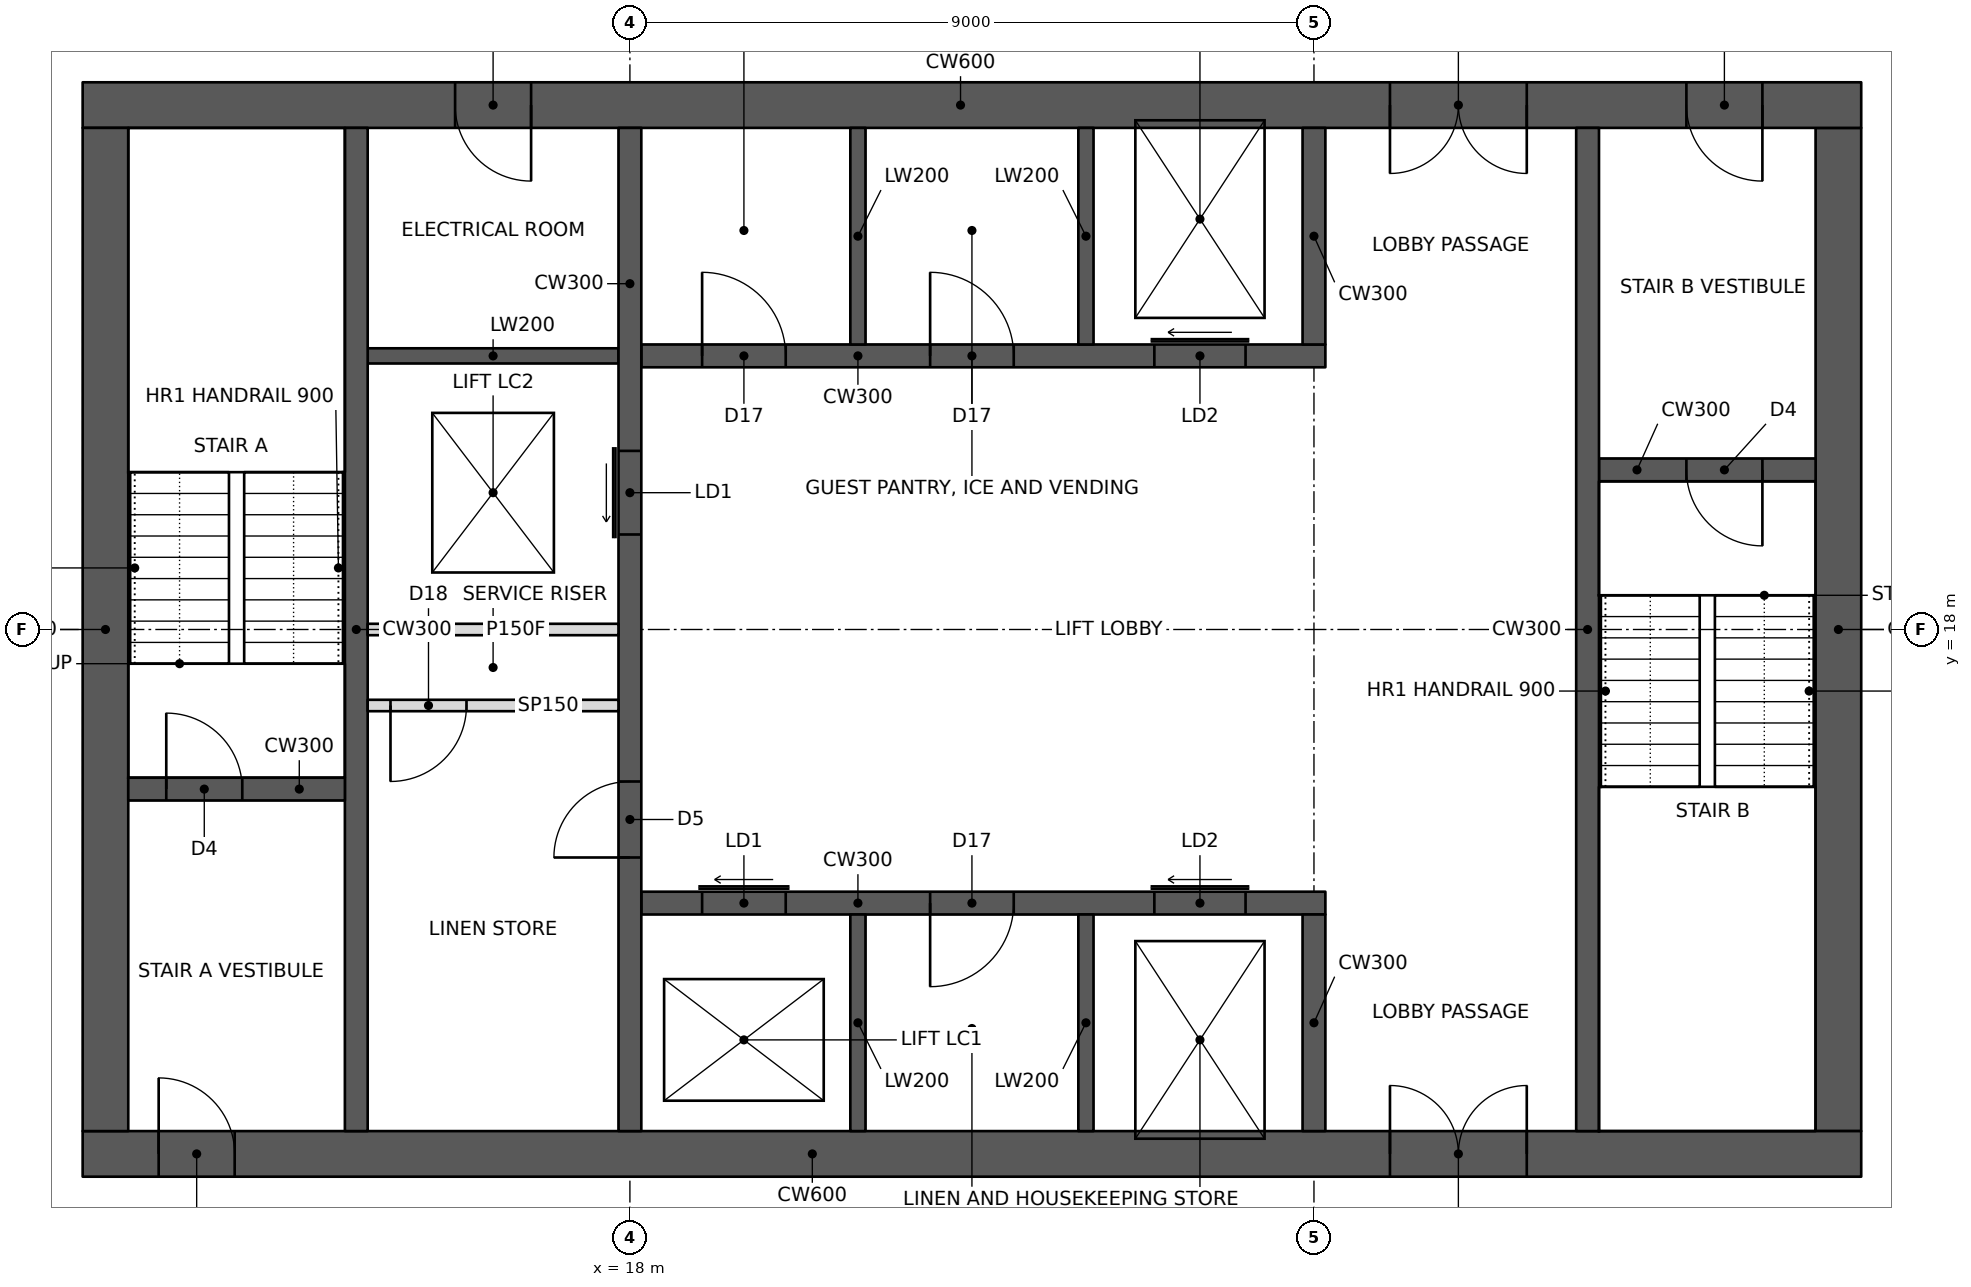
"""IFC4 building model, lengths in metres.
Left out: names, types, materials, properties, quantities, classifications, styles, units other than length and angle.
Written with IfcOpenShell. Run it as: python <this file> out.ifc"""

import sys

from ifc_helpers import new_model, si_unit, direction, frame, frame_2d, origin, place, context, subcontext, project, spatial, rectangle, extrude, element, fill, save


model = new_model("IFC4")
c1 = context("Model", 3, precision=1e-05, world=origin(), true_north=direction((0.0, 1.0)))
c2 = subcontext(c1, "Body", "Model", "MODEL_VIEW")
j1 = project(units=[si_unit("LENGTHUNIT", "METRE"), si_unit("PLANEANGLEUNIT", "RADIAN")], contexts=[c1])
p1 = place(None, origin())
s1 = spatial("IfcSite", under=j1, at=p1, CompositionType="ELEMENT")
p2 = place(p1, origin())
s2 = spatial("IfcBuilding", under=s1, at=p2, CompositionType="ELEMENT")
p3 = place(p2, frame((0.0, 0.0, 180.8)))
s3 = spatial("IfcBuildingStorey", under=s2, at=p3, CompositionType="ELEMENT", Elevation=180.8)
p4 = place(p3, frame((10.8, 11.1, 0.0), z_axis=(0.0, 0.0, 1.0), x_axis=(1.0, 0.0, 0.0)))
e1 = element("IfcWall", 1, at=p4, inside=s3, PredefinedType="SHEAR", context=c2, shape_type="SweptSolid", body=[
    extrude(rectangle(XDim=23.4, YDim=0.6, at=frame_2d((11.7, 0.0))), origin(), (0.0, 0.0, 1.0), 3.4),
])
p5 = place(p4, frame((1.0, 0.0, 0.0)))
e2 = element("IfcOpeningElement", 2, at=p5, cuts=e1, PredefinedType="OPENING", context=c2, shape_type="SweptSolid", body=[
    extrude(rectangle(XDim=1.0, YDim=2.1, at=frame_2d((0.5, 1.05))), frame((0.0, 0.31, 0.0), z_axis=(0.0, -1.0, 0.0), x_axis=(1.0, 0.0, 0.0)), (0.0, 0.0, 1.0), 0.62),
])
p6 = place(p4, frame((17.2, 0.0, 0.0)))
e3 = element("IfcOpeningElement", 3, at=p6, cuts=e1, PredefinedType="OPENING", context=c2, shape_type="SweptSolid", body=[
    extrude(rectangle(XDim=1.8, YDim=2.1, at=frame_2d((0.9, 1.05))), frame((0.0, 0.31, 0.0), z_axis=(0.0, -1.0, 0.0), x_axis=(1.0, 0.0, 0.0)), (0.0, 0.0, 1.0), 0.62),
])
p7 = place(p3, frame((10.8, 24.9, 0.0), z_axis=(0.0, 0.0, 1.0), x_axis=(1.0, 0.0, 0.0)))
e4 = element("IfcWall", 4, at=p7, inside=s3, PredefinedType="SHEAR", context=c2, shape_type="SweptSolid", body=[
    extrude(rectangle(XDim=23.4, YDim=0.6, at=frame_2d((11.7, 0.0))), origin(), (0.0, 0.0, 1.0), 3.4),
])
p8 = place(p7, frame((17.2, 0.0, 0.0)))
e5 = element("IfcOpeningElement", 5, at=p8, cuts=e4, PredefinedType="OPENING", context=c2, shape_type="SweptSolid", body=[
    extrude(rectangle(XDim=1.8, YDim=2.1, at=frame_2d((0.9, 1.05))), frame((0.0, 0.31, 0.0), z_axis=(0.0, -1.0, 0.0), x_axis=(1.0, 0.0, 0.0)), (0.0, 0.0, 1.0), 0.62),
])
p9 = place(p7, frame((21.1, 0.0, 0.0)))
e6 = element("IfcOpeningElement", 6, at=p9, cuts=e4, PredefinedType="OPENING", context=c2, shape_type="SweptSolid", body=[
    extrude(rectangle(XDim=1.0, YDim=2.1, at=frame_2d((0.5, 1.05))), frame((0.0, 0.31, 0.0), z_axis=(0.0, -1.0, 0.0), x_axis=(1.0, 0.0, 0.0)), (0.0, 0.0, 1.0), 0.62),
])
p10 = place(p7, frame((4.9, 0.0, 0.0)))
e7 = element("IfcOpeningElement", 7, at=p10, cuts=e4, PredefinedType="OPENING", context=c2, shape_type="SweptSolid", body=[
    extrude(rectangle(XDim=1.0, YDim=2.1, at=frame_2d((0.5, 1.05))), frame((0.0, 0.31, 0.0), z_axis=(0.0, -1.0, 0.0), x_axis=(1.0, 0.0, 0.0)), (0.0, 0.0, 1.0), 0.62),
])
for number, where, z_axis, x_axis in (
    (8, (11.1, 11.4, 0.0), (0.0, 0.0, 1.0), (0.0, 1.0, 0.0)),
    (9, (33.9, 11.4, 0.0), (0.0, 0.0, 1.0), (0.0, 1.0, 0.0)),
):
    element("IfcWall", number, at=place(p3, frame(where, z_axis=z_axis, x_axis=x_axis)), inside=s3, PredefinedType="SHEAR", context=c2, shape_type="SweptSolid", body=[
        extrude(rectangle(XDim=13.2, YDim=0.6, at=frame_2d((6.6, 0.0))), origin(), (0.0, 0.0, 1.0), 3.4),
    ])
p11 = place(p3, frame((14.4, 11.4, 0.0), z_axis=(0.0, 0.0, 1.0), x_axis=(0.0, 1.0, 0.0)))
e10 = element("IfcWall", 10, at=p11, inside=s3, PredefinedType="SHEAR", context=c2, shape_type="SweptSolid", body=[
    extrude(rectangle(XDim=13.2, YDim=0.3, at=frame_2d((6.6, 0.0))), origin(), (0.0, 0.0, 1.0), 3.4),
])
p12 = place(p3, frame((11.4, 15.9, 0.0), z_axis=(0.0, 0.0, 1.0), x_axis=(1.0, 0.0, 0.0)))
e11 = element("IfcWall", 11, at=p12, inside=s3, PredefinedType="SHEAR", context=c2, shape_type="SweptSolid", body=[
    extrude(rectangle(XDim=2.85, YDim=0.3, at=frame_2d((1.425, 0.0))), origin(), (0.0, 0.0, 1.0), 3.4),
])
p13 = place(p12, frame((0.5, 0.0, 0.0)))
e12 = element("IfcOpeningElement", 12, at=p13, cuts=e11, PredefinedType="OPENING", context=c2, shape_type="SweptSolid", body=[
    extrude(rectangle(XDim=1.0, YDim=2.1, at=frame_2d((0.5, 1.05))), frame((0.0, 0.16, 0.0), z_axis=(0.0, -1.0, 0.0), x_axis=(1.0, 0.0, 0.0)), (0.0, 0.0, 1.0), 0.32),
])
p14 = place(p3, frame((18.0, 11.4, 0.0), z_axis=(0.0, 0.0, 1.0), x_axis=(0.0, 1.0, 0.0)))
e13 = element("IfcWall", 13, at=p14, inside=s3, PredefinedType="SHEAR", context=c2, shape_type="SweptSolid", body=[
    extrude(rectangle(XDim=13.2, YDim=0.3, at=frame_2d((6.6, 0.0))), origin(), (0.0, 0.0, 1.0), 3.4),
])
p15 = place(p14, frame((3.6, 0.0, 0.0)))
e14 = element("IfcOpeningElement", 14, at=p15, cuts=e13, PredefinedType="OPENING", context=c2, shape_type="SweptSolid", body=[
    extrude(rectangle(XDim=1.0, YDim=2.1, at=frame_2d((0.5, 1.05))), frame((0.0, 0.16, 0.0), z_axis=(0.0, -1.0, 0.0), x_axis=(1.0, 0.0, 0.0)), (0.0, 0.0, 1.0), 0.32),
])
p16 = place(p14, frame((7.85, 0.0, 0.0)))
e15 = element("IfcOpeningElement", 15, at=p16, cuts=e13, PredefinedType="OPENING", context=c2, shape_type="SweptSolid", body=[
    extrude(rectangle(XDim=1.1, YDim=2.1, at=frame_2d((0.55, 1.05))), frame((0.0, 0.16, 0.0), z_axis=(0.0, -1.0, 0.0), x_axis=(1.0, 0.0, 0.0)), (0.0, 0.0, 1.0), 0.32),
])
p17 = place(p3, frame((14.55, 18.0, 0.0), z_axis=(0.0, 0.0, 1.0), x_axis=(1.0, 0.0, 0.0)))
e16 = element("IfcWall", 16, at=p17, inside=s3, PredefinedType="PARTITIONING", context=c2, shape_type="SweptSolid", body=[
    extrude(rectangle(XDim=3.3, YDim=0.15, at=frame_2d((1.65, 0.0))), origin(), (0.0, 0.0, 1.0), 3.2),
])
p18 = place(p3, frame((18.15, 14.4, 0.0), z_axis=(0.0, 0.0, 1.0), x_axis=(1.0, 0.0, 0.0)))
e17 = element("IfcWall", 17, at=p18, inside=s3, PredefinedType="SHEAR", context=c2, shape_type="SweptSolid", body=[
    extrude(rectangle(XDim=9.0, YDim=0.3, at=frame_2d((4.5, 0.0))), origin(), (0.0, 0.0, 1.0), 3.4),
])
p19 = place(p18, frame((0.8, 0.0, 0.0)))
e18 = element("IfcOpeningElement", 18, at=p19, cuts=e17, PredefinedType="OPENING", context=c2, shape_type="SweptSolid", body=[
    extrude(rectangle(XDim=1.1, YDim=2.1, at=frame_2d((0.55, 1.05))), frame((0.0, 0.16, 0.0), z_axis=(0.0, -1.0, 0.0), x_axis=(1.0, 0.0, 0.0)), (0.0, 0.0, 1.0), 0.32),
])
p20 = place(p18, frame((6.75, 0.0, 0.0)))
e19 = element("IfcOpeningElement", 19, at=p20, cuts=e17, PredefinedType="OPENING", context=c2, shape_type="SweptSolid", body=[
    extrude(rectangle(XDim=1.2, YDim=2.1, at=frame_2d((0.6, 1.05))), frame((0.0, 0.16, 0.0), z_axis=(0.0, -1.0, 0.0), x_axis=(1.0, 0.0, 0.0)), (0.0, 0.0, 1.0), 0.32),
])
p21 = place(p18, frame((3.8, 0.0, 0.0)))
e20 = element("IfcOpeningElement", 20, at=p21, cuts=e17, PredefinedType="OPENING", context=c2, shape_type="SweptSolid", body=[
    extrude(rectangle(XDim=1.1, YDim=2.1, at=frame_2d((0.55, 1.05))), frame((0.0, 0.16, 0.0), z_axis=(0.0, -1.0, 0.0), x_axis=(1.0, 0.0, 0.0)), (0.0, 0.0, 1.0), 0.32),
])
p22 = place(p3, frame((27.0, 11.4, 0.0), z_axis=(0.0, 0.0, 1.0), x_axis=(0.0, 1.0, 0.0)))
e21 = element("IfcWall", 21, at=p22, inside=s3, PredefinedType="SHEAR", context=c2, shape_type="SweptSolid", body=[
    extrude(rectangle(XDim=2.85, YDim=0.3, at=frame_2d((1.425, 0.0))), origin(), (0.0, 0.0, 1.0), 3.4),
])
for number, where, z_axis, x_axis in (
    (22, (21.0, 11.4, 0.0), (0.0, 0.0, 1.0), (0.0, 1.0, 0.0)),
    (23, (24.0, 11.4, 0.0), (0.0, 0.0, 1.0), (0.0, 1.0, 0.0)),
):
    element("IfcWall", number, at=place(p3, frame(where, z_axis=z_axis, x_axis=x_axis)), inside=s3, PredefinedType="SHEAR", context=c2, shape_type="SweptSolid", body=[
        extrude(rectangle(XDim=2.85, YDim=0.2, at=frame_2d((1.425, 0.0))), origin(), (0.0, 0.0, 1.0), 3.4),
    ])
p23 = place(p3, frame((18.15, 21.6, 0.0), z_axis=(0.0, 0.0, 1.0), x_axis=(1.0, 0.0, 0.0)))
e24 = element("IfcWall", 24, at=p23, inside=s3, PredefinedType="SHEAR", context=c2, shape_type="SweptSolid", body=[
    extrude(rectangle(XDim=9.0, YDim=0.3, at=frame_2d((4.5, 0.0))), origin(), (0.0, 0.0, 1.0), 3.4),
])
p24 = place(p23, frame((6.75, 0.0, 0.0)))
e25 = element("IfcOpeningElement", 25, at=p24, cuts=e24, PredefinedType="OPENING", context=c2, shape_type="SweptSolid", body=[
    extrude(rectangle(XDim=1.2, YDim=2.1, at=frame_2d((0.6, 1.05))), frame((0.0, 0.16, 0.0), z_axis=(0.0, -1.0, 0.0), x_axis=(1.0, 0.0, 0.0)), (0.0, 0.0, 1.0), 0.32),
])
p25 = place(p23, frame((0.8, 0.0, 0.0)))
e26 = element("IfcOpeningElement", 26, at=p25, cuts=e24, PredefinedType="OPENING", context=c2, shape_type="SweptSolid", body=[
    extrude(rectangle(XDim=1.1, YDim=2.1, at=frame_2d((0.55, 1.05))), frame((0.0, 0.16, 0.0), z_axis=(0.0, -1.0, 0.0), x_axis=(1.0, 0.0, 0.0)), (0.0, 0.0, 1.0), 0.32),
])
p26 = place(p23, frame((3.8, 0.0, 0.0)))
e27 = element("IfcOpeningElement", 27, at=p26, cuts=e24, PredefinedType="OPENING", context=c2, shape_type="SweptSolid", body=[
    extrude(rectangle(XDim=1.1, YDim=2.1, at=frame_2d((0.55, 1.05))), frame((0.0, 0.16, 0.0), z_axis=(0.0, -1.0, 0.0), x_axis=(1.0, 0.0, 0.0)), (0.0, 0.0, 1.0), 0.32),
])
p27 = place(p3, frame((27.0, 21.75, 0.0), z_axis=(0.0, 0.0, 1.0), x_axis=(0.0, 1.0, 0.0)))
e28 = element("IfcWall", 28, at=p27, inside=s3, PredefinedType="SHEAR", context=c2, shape_type="SweptSolid", body=[
    extrude(rectangle(XDim=2.85, YDim=0.3, at=frame_2d((1.425, 0.0))), origin(), (0.0, 0.0, 1.0), 3.4),
])
for number, where, z_axis, x_axis in (
    (29, (21.0, 21.75, 0.0), (0.0, 0.0, 1.0), (0.0, 1.0, 0.0)),
    (30, (24.0, 21.75, 0.0), (0.0, 0.0, 1.0), (0.0, 1.0, 0.0)),
):
    element("IfcWall", number, at=place(p3, frame(where, z_axis=z_axis, x_axis=x_axis)), inside=s3, PredefinedType="SHEAR", context=c2, shape_type="SweptSolid", body=[
        extrude(rectangle(XDim=2.85, YDim=0.2, at=frame_2d((1.425, 0.0))), origin(), (0.0, 0.0, 1.0), 3.4),
    ])
p28 = place(p3, frame((30.6, 11.4, 0.0), z_axis=(0.0, 0.0, 1.0), x_axis=(0.0, 1.0, 0.0)))
e31 = element("IfcWall", 31, at=p28, inside=s3, PredefinedType="SHEAR", context=c2, shape_type="SweptSolid", body=[
    extrude(rectangle(XDim=13.2, YDim=0.3, at=frame_2d((6.6, 0.0))), origin(), (0.0, 0.0, 1.0), 3.4),
])
p29 = place(p3, frame((30.75, 20.1, 0.0), z_axis=(0.0, 0.0, 1.0), x_axis=(1.0, 0.0, 0.0)))
e32 = element("IfcWall", 32, at=p29, inside=s3, PredefinedType="SHEAR", context=c2, shape_type="SweptSolid", body=[
    extrude(rectangle(XDim=2.85, YDim=0.3, at=frame_2d((1.425, 0.0))), origin(), (0.0, 0.0, 1.0), 3.4),
])
p30 = place(p29, frame((1.15, 0.0, 0.0)))
e33 = element("IfcOpeningElement", 33, at=p30, cuts=e32, PredefinedType="OPENING", context=c2, shape_type="SweptSolid", body=[
    extrude(rectangle(XDim=1.0, YDim=2.1, at=frame_2d((0.5, 1.05))), frame((0.0, 0.16, 0.0), z_axis=(0.0, -1.0, 0.0), x_axis=(1.0, 0.0, 0.0)), (0.0, 0.0, 1.0), 0.32),
])
p31 = place(p3, frame((14.55, 21.6, 0.0), z_axis=(0.0, 0.0, 1.0), x_axis=(1.0, 0.0, 0.0)))
e34 = element("IfcWall", 34, at=p31, inside=s3, PredefinedType="SHEAR", context=c2, shape_type="SweptSolid", body=[
    extrude(rectangle(XDim=3.3, YDim=0.2, at=frame_2d((1.65, 0.0))), origin(), (0.0, 0.0, 1.0), 3.4),
])
p32 = place(p3, frame((14.55, 17.0, 0.0), z_axis=(0.0, 0.0, 1.0), x_axis=(1.0, 0.0, 0.0)))
e35 = element("IfcWall", 35, at=p32, inside=s3, PredefinedType="PARTITIONING", context=c2, shape_type="SweptSolid", body=[
    extrude(rectangle(XDim=3.3, YDim=0.15, at=frame_2d((1.65, 0.0))), origin(), (0.0, 0.0, 1.0), 3.2),
])
p33 = place(p32, frame((0.3, 0.0, 0.0)))
e36 = element("IfcOpeningElement", 36, at=p33, cuts=e35, PredefinedType="OPENING", context=c2, shape_type="SweptSolid", body=[
    extrude(rectangle(XDim=1.0, YDim=2.1, at=frame_2d((0.5, 1.05))), frame((0.0, 0.085, 0.0), z_axis=(0.0, -1.0, 0.0), x_axis=(1.0, 0.0, 0.0)), (0.0, 0.0, 1.0), 0.17),
])
p34 = place(p33, frame((1.0, 0.0, 0.0), z_axis=(0.0, 0.0, 1.0), x_axis=(-1.0, 0.0, 0.0)))
e37 = element("IfcDoor", 37, at=p34, inside=s3, OperationType="SINGLE_SWING_RIGHT", PredefinedType="DOOR", context=c2, shape_type="SweptSolid", body=[
    extrude(rectangle(XDim=1.0, YDim=2.1, at=frame_2d((0.5, 1.05))), frame((0.0, 0.025, 0.0), z_axis=(0.0, -1.0, 0.0), x_axis=(1.0, 0.0, 0.0)), (0.0, 0.0, 1.0), 0.05),
])
fill(e36, e37)
p35 = place(p5, origin())
e38 = element("IfcDoor", 38, at=p35, inside=s3, OperationType="SINGLE_SWING_LEFT", PredefinedType="DOOR", context=c2, shape_type="SweptSolid", body=[
    extrude(rectangle(XDim=1.0, YDim=2.1, at=frame_2d((0.5, 1.05))), frame((0.0, 0.025, 0.0), z_axis=(0.0, -1.0, 0.0), x_axis=(1.0, 0.0, 0.0)), (0.0, 0.0, 1.0), 0.05),
])
fill(e2, e38)
p36 = place(p13, origin())
e39 = element("IfcDoor", 39, at=p36, inside=s3, OperationType="SINGLE_SWING_LEFT", PredefinedType="DOOR", context=c2, shape_type="SweptSolid", body=[
    extrude(rectangle(XDim=1.0, YDim=2.1, at=frame_2d((0.5, 1.05))), frame((0.0, 0.025, 0.0), z_axis=(0.0, -1.0, 0.0), x_axis=(1.0, 0.0, 0.0)), (0.0, 0.0, 1.0), 0.05),
])
fill(e12, e39)
p37 = place(p6, origin())
e40 = element("IfcDoor", 40, at=p37, inside=s3, OperationType="DOUBLE_DOOR_SINGLE_SWING", PredefinedType="DOOR", context=c2, shape_type="SweptSolid", body=[
    extrude(rectangle(XDim=1.8, YDim=2.1, at=frame_2d((0.9, 1.05))), frame((0.0, 0.025, 0.0), z_axis=(0.0, -1.0, 0.0), x_axis=(1.0, 0.0, 0.0)), (0.0, 0.0, 1.0), 0.05),
])
fill(e3, e40)
p38 = place(p8, frame((1.8, 0.0, 0.0), z_axis=(0.0, 0.0, 1.0), x_axis=(-1.0, 0.0, 0.0)))
e41 = element("IfcDoor", 41, at=p38, inside=s3, OperationType="DOUBLE_DOOR_SINGLE_SWING", PredefinedType="DOOR", context=c2, shape_type="SweptSolid", body=[
    extrude(rectangle(XDim=1.8, YDim=2.1, at=frame_2d((0.9, 1.05))), frame((0.0, 0.025, 0.0), z_axis=(0.0, -1.0, 0.0), x_axis=(1.0, 0.0, 0.0)), (0.0, 0.0, 1.0), 0.05),
])
fill(e5, e41)
p39 = place(p9, frame((1.0, 0.0, 0.0), z_axis=(0.0, 0.0, 1.0), x_axis=(-1.0, 0.0, 0.0)))
e42 = element("IfcDoor", 42, at=p39, inside=s3, OperationType="SINGLE_SWING_LEFT", PredefinedType="DOOR", context=c2, shape_type="SweptSolid", body=[
    extrude(rectangle(XDim=1.0, YDim=2.1, at=frame_2d((0.5, 1.05))), frame((0.0, 0.025, 0.0), z_axis=(0.0, -1.0, 0.0), x_axis=(1.0, 0.0, 0.0)), (0.0, 0.0, 1.0), 0.05),
])
fill(e6, e42)
p40 = place(p30, frame((1.0, 0.0, 0.0), z_axis=(0.0, 0.0, 1.0), x_axis=(-1.0, 0.0, 0.0)))
e43 = element("IfcDoor", 43, at=p40, inside=s3, OperationType="SINGLE_SWING_LEFT", PredefinedType="DOOR", context=c2, shape_type="SweptSolid", body=[
    extrude(rectangle(XDim=1.0, YDim=2.1, at=frame_2d((0.5, 1.05))), frame((0.0, 0.025, 0.0), z_axis=(0.0, -1.0, 0.0), x_axis=(1.0, 0.0, 0.0)), (0.0, 0.0, 1.0), 0.05),
])
fill(e33, e43)
p41 = place(p15, origin())
e44 = element("IfcDoor", 44, at=p41, inside=s3, OperationType="SINGLE_SWING_LEFT", PredefinedType="DOOR", context=c2, shape_type="SweptSolid", body=[
    extrude(rectangle(XDim=1.0, YDim=2.1, at=frame_2d((0.5, 1.05))), frame((0.0, 0.025, 0.0), z_axis=(0.0, -1.0, 0.0), x_axis=(1.0, 0.0, 0.0)), (0.0, 0.0, 1.0), 0.05),
])
fill(e14, e44)
p42 = place(p10, frame((1.0, 0.0, 0.0), z_axis=(0.0, 0.0, 1.0), x_axis=(-1.0, 0.0, 0.0)))
e45 = element("IfcDoor", 45, at=p42, inside=s3, OperationType="SINGLE_SWING_LEFT", PredefinedType="DOOR", context=c2, shape_type="SweptSolid", body=[
    extrude(rectangle(XDim=1.0, YDim=2.1, at=frame_2d((0.5, 1.05))), frame((0.0, 0.025, 0.0), z_axis=(0.0, -1.0, 0.0), x_axis=(1.0, 0.0, 0.0)), (0.0, 0.0, 1.0), 0.05),
])
fill(e7, e45)
p43 = place(p19, origin())
e46 = element("IfcDoor", 46, at=p43, inside=s3, OperationType="SLIDING_TO_LEFT", PredefinedType="DOOR", context=c2, shape_type="SweptSolid", body=[
    extrude(rectangle(XDim=1.1, YDim=2.1, at=frame_2d((0.55, 1.05))), frame((0.0, 0.025, 0.0), z_axis=(0.0, -1.0, 0.0), x_axis=(1.0, 0.0, 0.0)), (0.0, 0.0, 1.0), 0.05),
])
fill(e18, e46)
p44 = place(p16, origin())
e47 = element("IfcDoor", 47, at=p44, inside=s3, OperationType="SLIDING_TO_LEFT", PredefinedType="DOOR", context=c2, shape_type="SweptSolid", body=[
    extrude(rectangle(XDim=1.1, YDim=2.1, at=frame_2d((0.55, 1.05))), frame((0.0, 0.025, 0.0), z_axis=(0.0, -1.0, 0.0), x_axis=(1.0, 0.0, 0.0)), (0.0, 0.0, 1.0), 0.05),
])
fill(e15, e47)
p45 = place(p20, origin())
e48 = element("IfcDoor", 48, at=p45, inside=s3, OperationType="SLIDING_TO_LEFT", PredefinedType="DOOR", context=c2, shape_type="SweptSolid", body=[
    extrude(rectangle(XDim=1.2, YDim=2.1, at=frame_2d((0.6, 1.05))), frame((0.0, 0.025, 0.0), z_axis=(0.0, -1.0, 0.0), x_axis=(1.0, 0.0, 0.0)), (0.0, 0.0, 1.0), 0.05),
])
fill(e19, e48)
p46 = place(p24, origin())
e49 = element("IfcDoor", 49, at=p46, inside=s3, OperationType="SLIDING_TO_LEFT", PredefinedType="DOOR", context=c2, shape_type="SweptSolid", body=[
    extrude(rectangle(XDim=1.2, YDim=2.1, at=frame_2d((0.6, 1.05))), frame((0.0, 0.025, 0.0), z_axis=(0.0, -1.0, 0.0), x_axis=(1.0, 0.0, 0.0)), (0.0, 0.0, 1.0), 0.05),
])
fill(e25, e49)
p47 = place(p25, origin())
e50 = element("IfcDoor", 50, at=p47, inside=s3, OperationType="SINGLE_SWING_LEFT", PredefinedType="DOOR", context=c2, shape_type="SweptSolid", body=[
    extrude(rectangle(XDim=1.1, YDim=2.1, at=frame_2d((0.55, 1.05))), frame((0.0, 0.025, 0.0), z_axis=(0.0, -1.0, 0.0), x_axis=(1.0, 0.0, 0.0)), (0.0, 0.0, 1.0), 0.05),
])
fill(e26, e50)
p48 = place(p26, origin())
e51 = element("IfcDoor", 51, at=p48, inside=s3, OperationType="SINGLE_SWING_LEFT", PredefinedType="DOOR", context=c2, shape_type="SweptSolid", body=[
    extrude(rectangle(XDim=1.1, YDim=2.1, at=frame_2d((0.55, 1.05))), frame((0.0, 0.025, 0.0), z_axis=(0.0, -1.0, 0.0), x_axis=(1.0, 0.0, 0.0)), (0.0, 0.0, 1.0), 0.05),
])
fill(e27, e51)
p49 = place(p21, frame((1.1, 0.0, 0.0), z_axis=(0.0, 0.0, 1.0), x_axis=(-1.0, 0.0, 0.0)))
e52 = element("IfcDoor", 52, at=p49, inside=s3, OperationType="SINGLE_SWING_RIGHT", PredefinedType="DOOR", context=c2, shape_type="SweptSolid", body=[
    extrude(rectangle(XDim=1.1, YDim=2.1, at=frame_2d((0.55, 1.05))), frame((0.0, 0.025, 0.0), z_axis=(0.0, -1.0, 0.0), x_axis=(1.0, 0.0, 0.0)), (0.0, 0.0, 1.0), 0.05),
])
fill(e20, e52)
save(model, sys.argv[1])
